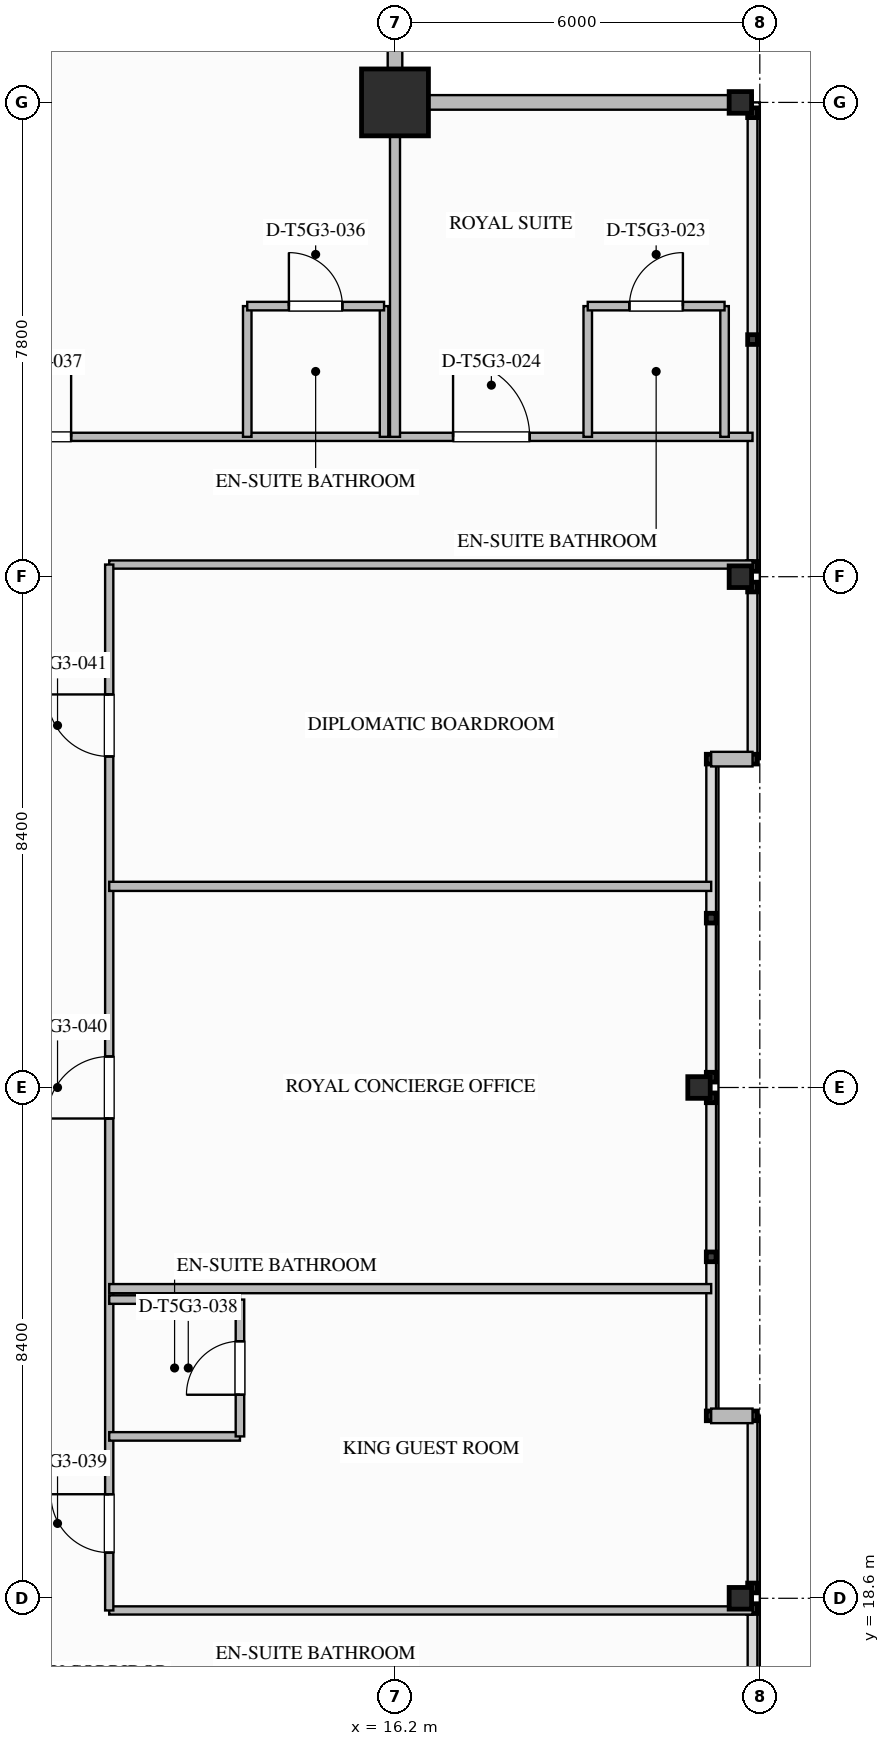
"""IFC4 building model, lengths in metres.
Left out: names, types, materials, properties, quantities, classifications, styles, units other than length and angle.
Written with IfcOpenShell. Run it as: python <this file> out.ifc"""

import sys

from ifc_helpers import new_model, si_unit, direction, frame, frame_2d, origin, origin_2d, place, context, subcontext, project, spatial, rectangle, i_section, extrude, element, fill, save


model = new_model("IFC4")
c1 = context("Model", 3, precision=1e-05, world=origin(), true_north=direction((0.0, 1.0)))
c2 = subcontext(c1, "Body", "Model", "MODEL_VIEW")
j1 = project(units=[si_unit("LENGTHUNIT", "METRE"), si_unit("PLANEANGLEUNIT", "RADIAN")], contexts=[c1])
p1 = place(None, origin())
s1 = spatial("IfcSite", under=j1, at=p1, CompositionType="ELEMENT")
p2 = place(p1, origin())
s2 = spatial("IfcBuilding", under=s1, at=p2, CompositionType="ELEMENT")
p3 = place(p2, frame((0.0, 0.0, 286.9)))
s3 = spatial("IfcBuildingStorey", under=s2, at=p3, CompositionType="ELEMENT", Elevation=286.9)
p4 = place(p3, frame((16.2, 43.2, 0.0), z_axis=(0.0, 0.0, 1.0), x_axis=(1.0, 0.0, 0.0)))
e1 = element("IfcColumn", 1, at=p4, inside=s3, PredefinedType="COLUMN", context=c2, shape_type="SweptSolid", body=[
    extrude(rectangle(XDim=1.1, YDim=1.1, at=origin_2d()), origin(), (0.0, 0.0, 1.0), 3.65),
])
for number, where, z_axis, x_axis in (
    (2, (21.88, 18.6, 0.0), (0.0, 0.0, 1.0), (1.0, 0.0, 0.0)),
    (3, (21.2, 27.0, 0.0), (0.0, 0.0, 1.0), (1.0, 0.0, 0.0)),
    (4, (21.88, 35.4, 0.0), (0.0, 0.0, 1.0), (1.0, 0.0, 0.0)),
    (5, (21.88, 43.2, 0.0), (0.0, 0.0, 1.0), (1.0, 0.0, 0.0)),
):
    element("IfcColumn", number, at=place(p3, frame(where, z_axis=z_axis, x_axis=x_axis)), inside=s3, PredefinedType="COLUMN", context=c2, shape_type="SweptSolid", body=[
        extrude(i_section(OverallWidth=0.369, OverallDepth=0.356, WebThickness=0.011, FlangeThickness=0.018, FilletRadius=0.025, at=origin_2d()), origin(), (0.0, 0.0, 1.0), 3.647),
    ])
for number, where, z_axis, x_axis in (
    (6, (16.2, 49.08, 0.0), (0.0, 0.0, 1.0), (0.0, -1.0, 0.0)),
    (7, (16.2, 43.2, 0.0), (0.0, 0.0, 1.0), (1.0, 0.0, 0.0)),
):
    element("IfcWall", number, at=place(p3, frame(where, z_axis=z_axis, x_axis=x_axis)), inside=s3, PredefinedType="STANDARD", context=c2, shape_type="SweptSolid", body=[
        extrude(rectangle(XDim=5.88, YDim=0.24, at=frame_2d((2.94, 0.0))), origin(), (0.0, 0.0, 1.0), 2.779),
    ])
for number, where, z_axis, x_axis in (
    (8, (22.08, 32.4, 0.0), (0.0, 0.0, 1.0), (-1.0, 0.0, 0.0)),
    (9, (21.4, 21.6, 0.0), (0.0, 0.0, 1.0), (1.0, 0.0, 0.0)),
):
    element("IfcWall", number, at=place(p3, frame(where, z_axis=z_axis, x_axis=x_axis)), inside=s3, PredefinedType="STANDARD", context=c2, shape_type="SweptSolid", body=[
        extrude(rectangle(XDim=0.68, YDim=0.24, at=frame_2d((0.34, 0.0))), origin(), (0.0, 0.0, 1.0), 3.39),
    ])
p5 = place(p3, frame((-16.2, 37.7, 0.0), z_axis=(0.0, 0.0, 1.0), x_axis=(1.0, 0.0, 0.0)))
e10 = element("IfcWall", 10, at=p5, inside=s3, PredefinedType="PARTITIONING", context=c2, shape_type="SweptSolid", body=[
    extrude(rectangle(XDim=38.28, YDim=0.135, at=frame_2d((19.14, 0.0))), origin(), (0.0, 0.0, 1.0), 3.39),
])
p6 = place(p5, frame((33.355, 0.0, 0.0)))
e11 = element("IfcOpeningElement", 11, at=p6, cuts=e10, PredefinedType="OPENING", context=c2, shape_type="SweptSolid", body=[
    extrude(rectangle(XDim=1.26, YDim=2.2, at=frame_2d((0.63, 1.1))), frame((0.0, 0.077, 0.0), z_axis=(0.0, -1.0, 0.0), x_axis=(1.0, 0.0, 0.0)), (0.0, 0.0, 1.0), 0.155),
])
p7 = place(p5, frame((3.292, 0.0, 0.0)))
e12 = element("IfcOpeningElement", 12, at=p7, cuts=e10, PredefinedType="OPENING", context=c2, shape_type="SweptSolid", body=[
    extrude(rectangle(XDim=1.26, YDim=2.2, at=frame_2d((0.63, 1.1))), frame((0.0, 0.077, 0.0), z_axis=(0.0, -1.0, 0.0), x_axis=(1.0, 0.0, 0.0)), (0.0, 0.0, 1.0), 0.155),
])
p8 = place(p5, frame((16.085, 0.0, 0.0)))
e13 = element("IfcOpeningElement", 13, at=p8, cuts=e10, PredefinedType="OPENING", context=c2, shape_type="SweptSolid", body=[
    extrude(rectangle(XDim=1.02, YDim=2.15, at=frame_2d((0.51, 1.075))), frame((0.0, 0.077, 0.0), z_axis=(0.0, -1.0, 0.0), x_axis=(1.0, 0.0, 0.0)), (0.0, 0.0, 1.0), 0.155),
])
p9 = place(p5, frame((25.813, 0.0, 0.0)))
e14 = element("IfcOpeningElement", 14, at=p9, cuts=e10, PredefinedType="OPENING", context=c2, shape_type="SweptSolid", body=[
    extrude(rectangle(XDim=1.26, YDim=2.2, at=frame_2d((0.63, 1.1))), frame((0.0, 0.077, 0.0), z_axis=(0.0, -1.0, 0.0), x_axis=(1.0, 0.0, 0.0)), (0.0, 0.0, 1.0), 0.155),
])
for number, where, z_axis, x_axis in (
    (15, (11.5, 18.4, 0.0), (0.0, 0.0, 1.0), (1.0, 0.0, 0.0)),
    (16, (11.5, 35.6, 0.0), (0.0, 0.0, 1.0), (1.0, 0.0, 0.0)),
):
    element("IfcWall", number, at=place(p3, frame(where, z_axis=z_axis, x_axis=x_axis)), inside=s3, PredefinedType="PARTITIONING", context=c2, shape_type="SweptSolid", body=[
        extrude(rectangle(XDim=10.58, YDim=0.135, at=frame_2d((5.29, 0.0))), origin(), (0.0, 0.0, 1.0), 2.768),
    ])
p10 = place(p3, frame((11.5, 18.4, 0.0), z_axis=(0.0, 0.0, 1.0), x_axis=(0.0, 1.0, 0.0)))
e17 = element("IfcWall", 17, at=p10, inside=s3, PredefinedType="PARTITIONING", context=c2, shape_type="SweptSolid", body=[
    extrude(rectangle(XDim=17.2, YDim=0.135, at=frame_2d((8.6, 0.0))), origin(), (0.0, 0.0, 1.0), 3.39),
])
p11 = place(p10, frame((0.951, 0.0, 0.0)))
e18 = element("IfcOpeningElement", 18, at=p11, cuts=e17, PredefinedType="OPENING", context=c2, shape_type="SweptSolid", body=[
    extrude(rectangle(XDim=0.96, YDim=2.15, at=frame_2d((0.48, 1.075))), frame((0.0, 0.077, 0.0), z_axis=(0.0, -1.0, 0.0), x_axis=(1.0, 0.0, 0.0)), (0.0, 0.0, 1.0), 0.155),
])
p12 = place(p10, frame((8.09, 0.0, 0.0)))
e19 = element("IfcOpeningElement", 19, at=p12, cuts=e17, PredefinedType="OPENING", context=c2, shape_type="SweptSolid", body=[
    extrude(rectangle(XDim=1.02, YDim=2.15, at=frame_2d((0.51, 1.075))), frame((0.0, 0.077, 0.0), z_axis=(0.0, -1.0, 0.0), x_axis=(1.0, 0.0, 0.0)), (0.0, 0.0, 1.0), 0.155),
])
p13 = place(p10, frame((14.044, 0.0, 0.0)))
e20 = element("IfcOpeningElement", 20, at=p13, cuts=e17, PredefinedType="OPENING", context=c2, shape_type="SweptSolid", body=[
    extrude(rectangle(XDim=1.02, YDim=2.15, at=frame_2d((0.51, 1.075))), frame((0.0, 0.077, 0.0), z_axis=(0.0, -1.0, 0.0), x_axis=(1.0, 0.0, 0.0)), (0.0, 0.0, 1.0), 0.155),
])
p14 = place(p3, frame((16.2, 37.7, 0.0), z_axis=(0.0, 0.0, 1.0), x_axis=(0.0, 1.0, 0.0)))
e21 = element("IfcWall", 21, at=p14, inside=s3, PredefinedType="PARTITIONING", context=c2, shape_type="SweptSolid", body=[
    extrude(rectangle(XDim=5.38, YDim=0.165, at=frame_2d((2.69, 0.0))), origin(), (0.0, 0.0, 1.0), 2.764),
])
for number, where, z_axis, x_axis in (
    (22, (19.37, 37.7, 0.0), (0.0, 0.0, 1.0), (0.0, 1.0, 0.0)),
    (23, (21.62, 37.7, 0.0), (0.0, 0.0, 1.0), (0.0, 1.0, 0.0)),
):
    element("IfcWall", number, at=place(p3, frame(where, z_axis=z_axis, x_axis=x_axis)), inside=s3, PredefinedType="PLUMBINGWALL", context=c2, shape_type="SweptSolid", body=[
        extrude(rectangle(XDim=2.15, YDim=0.14, at=frame_2d((1.075, 0.0))), origin(), (0.0, 0.0, 1.0), 3.39),
    ])
p15 = place(p3, frame((19.37, 39.85, 0.0), z_axis=(0.0, 0.0, 1.0), x_axis=(1.0, 0.0, 0.0)))
e24 = element("IfcWall", 24, at=p15, inside=s3, PredefinedType="PLUMBINGWALL", context=c2, shape_type="SweptSolid", body=[
    extrude(rectangle(XDim=2.25, YDim=0.14, at=frame_2d((1.125, 0.0))), origin(), (0.0, 0.0, 1.0), 3.39),
])
p16 = place(p15, frame((0.685, 0.0, 0.0)))
e25 = element("IfcOpeningElement", 25, at=p16, cuts=e24, PredefinedType="OPENING", context=c2, shape_type="SweptSolid", body=[
    extrude(rectangle(XDim=0.88, YDim=2.1, at=frame_2d((0.44, 1.05))), frame((0.0, 0.08, 0.0), z_axis=(0.0, -1.0, 0.0), x_axis=(1.0, 0.0, 0.0)), (0.0, 0.0, 1.0), 0.16),
])
p17 = place(p3, frame((13.77, 37.7, 0.0), z_axis=(0.0, 0.0, 1.0), x_axis=(0.0, 1.0, 0.0)))
e26 = element("IfcWall", 26, at=p17, inside=s3, PredefinedType="PLUMBINGWALL", context=c2, shape_type="SweptSolid", body=[
    extrude(rectangle(XDim=2.15, YDim=0.14, at=frame_2d((1.075, 0.0))), origin(), (0.0, 0.0, 1.0), 3.39),
])
p18 = place(p3, frame((16.02, 37.7, 0.0), z_axis=(0.0, 0.0, 1.0), x_axis=(0.0, 1.0, 0.0)))
e27 = element("IfcWall", 27, at=p18, inside=s3, PredefinedType="PLUMBINGWALL", context=c2, shape_type="SweptSolid", body=[
    extrude(rectangle(XDim=2.15, YDim=0.14, at=frame_2d((1.075, 0.0))), origin(), (0.0, 0.0, 1.0), 2.764),
])
p19 = place(p3, frame((13.77, 39.85, 0.0), z_axis=(0.0, 0.0, 1.0), x_axis=(1.0, 0.0, 0.0)))
e28 = element("IfcWall", 28, at=p19, inside=s3, PredefinedType="PLUMBINGWALL", context=c2, shape_type="SweptSolid", body=[
    extrude(rectangle(XDim=2.25, YDim=0.14, at=frame_2d((1.125, 0.0))), origin(), (0.0, 0.0, 1.0), 3.39),
])
p20 = place(p19, frame((0.685, 0.0, 0.0)))
e29 = element("IfcOpeningElement", 29, at=p20, cuts=e28, PredefinedType="OPENING", context=c2, shape_type="SweptSolid", body=[
    extrude(rectangle(XDim=0.88, YDim=2.1, at=frame_2d((0.44, 1.05))), frame((0.0, 0.08, 0.0), z_axis=(0.0, -1.0, 0.0), x_axis=(1.0, 0.0, 0.0)), (0.0, 0.0, 1.0), 0.16),
])
for number, where, z_axis, x_axis in (
    (30, (11.5, 21.262, 0.0), (0.0, 0.0, 1.0), (1.0, 0.0, 0.0)),
    (31, (11.5, 23.512, 0.0), (0.0, 0.0, 1.0), (1.0, 0.0, 0.0)),
):
    element("IfcWall", number, at=place(p3, frame(where, z_axis=z_axis, x_axis=x_axis)), inside=s3, PredefinedType="PLUMBINGWALL", context=c2, shape_type="SweptSolid", body=[
        extrude(rectangle(XDim=2.15, YDim=0.14, at=frame_2d((1.075, 0.0))), origin(), (0.0, 0.0, 1.0), 3.39),
    ])
p21 = place(p3, frame((13.65, 21.262, 0.0), z_axis=(0.0, 0.0, 1.0), x_axis=(0.0, 1.0, 0.0)))
e32 = element("IfcWall", 32, at=p21, inside=s3, PredefinedType="PLUMBINGWALL", context=c2, shape_type="SweptSolid", body=[
    extrude(rectangle(XDim=2.25, YDim=0.14, at=frame_2d((1.125, 0.0))), origin(), (0.0, 0.0, 1.0), 3.39),
])
p22 = place(p21, frame((0.685, 0.0, 0.0)))
e33 = element("IfcOpeningElement", 33, at=p22, cuts=e32, PredefinedType="OPENING", context=c2, shape_type="SweptSolid", body=[
    extrude(rectangle(XDim=0.88, YDim=2.1, at=frame_2d((0.44, 1.05))), frame((0.0, 0.08, 0.0), z_axis=(0.0, -1.0, 0.0), x_axis=(1.0, 0.0, 0.0)), (0.0, 0.0, 1.0), 0.16),
])
for number, where, z_axis, x_axis in (
    (34, (11.5, 23.692, 0.0), (0.0, 0.0, 1.0), (1.0, 0.0, 0.0)),
    (35, (11.5, 30.308, 0.0), (0.0, 0.0, 1.0), (1.0, 0.0, 0.0)),
):
    element("IfcWall", number, at=place(p3, frame(where, z_axis=z_axis, x_axis=x_axis)), inside=s3, PredefinedType="PARTITIONING", context=c2, shape_type="SweptSolid", body=[
        extrude(rectangle(XDim=9.9, YDim=0.15, at=frame_2d((4.95, 0.0))), origin(), (0.0, 0.0, 1.0), 3.39),
    ])
p23 = place(p16, origin())
e36 = element("IfcDoor", 36, at=p23, inside=s3, OperationType="SINGLE_SWING_RIGHT", PredefinedType="DOOR", context=c2, shape_type="SweptSolid", body=[
    extrude(rectangle(XDim=0.88, YDim=2.1, at=frame_2d((0.44, 1.05))), frame((0.0, 0.025, 0.0), z_axis=(0.0, -1.0, 0.0), x_axis=(1.0, 0.0, 0.0)), (0.0, 0.0, 1.0), 0.05),
])
fill(e25, e36)
p24 = place(p6, origin())
e37 = element("IfcDoor", 37, at=p24, inside=s3, OperationType="SINGLE_SWING_LEFT", PredefinedType="DOOR", context=c2, shape_type="SweptSolid", body=[
    extrude(rectangle(XDim=1.26, YDim=2.2, at=frame_2d((0.63, 1.1))), frame((0.0, 0.025, 0.0), z_axis=(0.0, -1.0, 0.0), x_axis=(1.0, 0.0, 0.0)), (0.0, 0.0, 1.0), 0.05),
])
fill(e11, e37)
p25 = place(p20, origin())
e38 = element("IfcDoor", 38, at=p25, inside=s3, OperationType="SINGLE_SWING_LEFT", PredefinedType="DOOR", context=c2, shape_type="SweptSolid", body=[
    extrude(rectangle(XDim=0.88, YDim=2.1, at=frame_2d((0.44, 1.05))), frame((0.0, 0.025, 0.0), z_axis=(0.0, -1.0, 0.0), x_axis=(1.0, 0.0, 0.0)), (0.0, 0.0, 1.0), 0.05),
])
fill(e29, e38)
p26 = place(p9, origin())
e39 = element("IfcDoor", 39, at=p26, inside=s3, OperationType="SINGLE_SWING_RIGHT", PredefinedType="DOOR", context=c2, shape_type="SweptSolid", body=[
    extrude(rectangle(XDim=1.26, YDim=2.2, at=frame_2d((0.63, 1.1))), frame((0.0, 0.025, 0.0), z_axis=(0.0, -1.0, 0.0), x_axis=(1.0, 0.0, 0.0)), (0.0, 0.0, 1.0), 0.05),
])
fill(e14, e39)
p27 = place(p22, origin())
e40 = element("IfcDoor", 40, at=p27, inside=s3, OperationType="SINGLE_SWING_LEFT", PredefinedType="DOOR", context=c2, shape_type="SweptSolid", body=[
    extrude(rectangle(XDim=0.88, YDim=2.1, at=frame_2d((0.44, 1.05))), frame((0.0, 0.025, 0.0), z_axis=(0.0, -1.0, 0.0), x_axis=(1.0, 0.0, 0.0)), (0.0, 0.0, 1.0), 0.05),
])
fill(e33, e40)
p28 = place(p11, origin())
e41 = element("IfcDoor", 41, at=p28, inside=s3, OperationType="SINGLE_SWING_RIGHT", PredefinedType="DOOR", context=c2, shape_type="SweptSolid", body=[
    extrude(rectangle(XDim=0.96, YDim=2.15, at=frame_2d((0.48, 1.075))), frame((0.0, 0.025, 0.0), z_axis=(0.0, -1.0, 0.0), x_axis=(1.0, 0.0, 0.0)), (0.0, 0.0, 1.0), 0.05),
])
fill(e18, e41)
p29 = place(p12, origin())
e42 = element("IfcDoor", 42, at=p29, inside=s3, OperationType="SINGLE_SWING_LEFT", PredefinedType="DOOR", context=c2, shape_type="SweptSolid", body=[
    extrude(rectangle(XDim=1.02, YDim=2.15, at=frame_2d((0.51, 1.075))), frame((0.0, 0.025, 0.0), z_axis=(0.0, -1.0, 0.0), x_axis=(1.0, 0.0, 0.0)), (0.0, 0.0, 1.0), 0.05),
])
fill(e19, e42)
p30 = place(p13, origin())
e43 = element("IfcDoor", 43, at=p30, inside=s3, OperationType="SINGLE_SWING_RIGHT", PredefinedType="DOOR", context=c2, shape_type="SweptSolid", body=[
    extrude(rectangle(XDim=1.02, YDim=2.15, at=frame_2d((0.51, 1.075))), frame((0.0, 0.025, 0.0), z_axis=(0.0, -1.0, 0.0), x_axis=(1.0, 0.0, 0.0)), (0.0, 0.0, 1.0), 0.05),
])
fill(e20, e43)
save(model, sys.argv[1])
